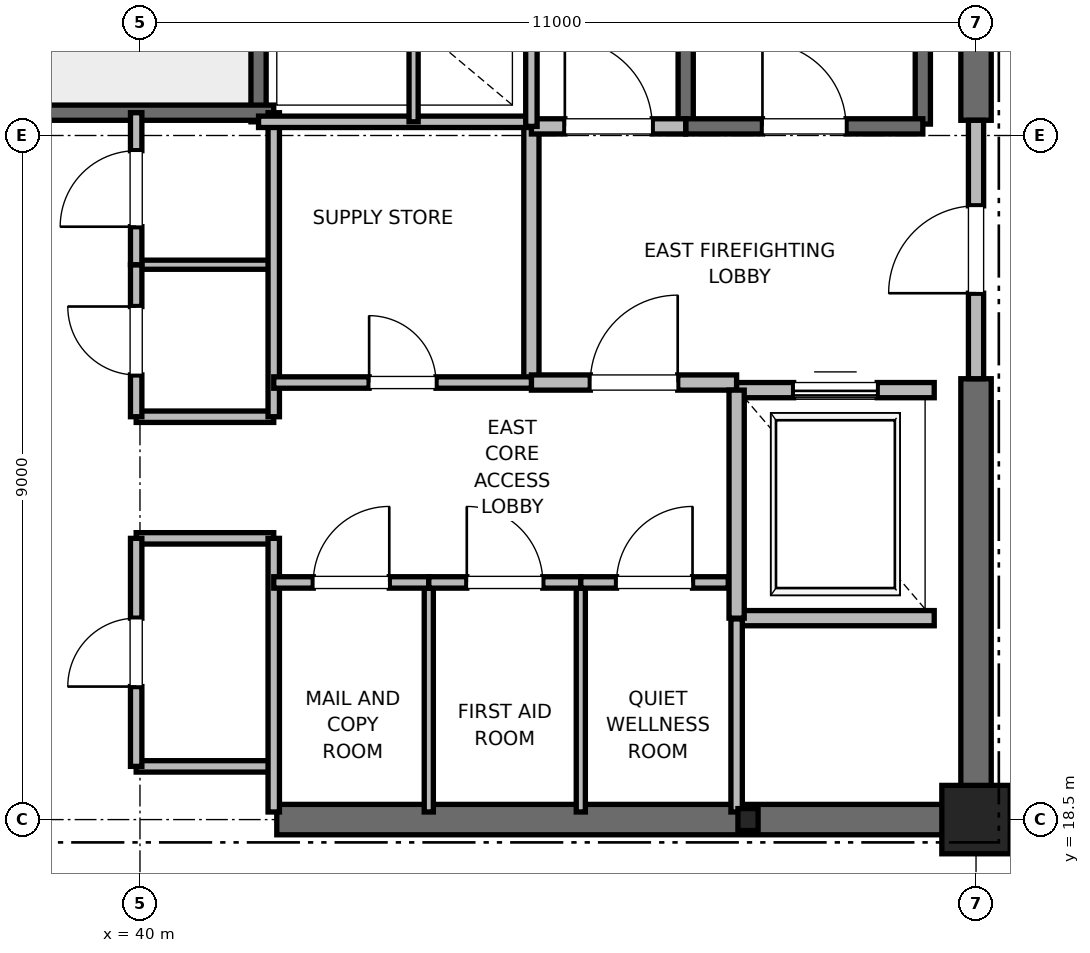
"""IFC4 building model, lengths in metres.
Left out: names, types, materials, properties, quantities, classifications, styles, units other than length and angle.
Written with IfcOpenShell. Run it as: python <this file> out.ifc"""

import sys

from ifc_helpers import new_model, si_unit, direction, frame, frame_2d, origin, origin_2d, place, context, subcontext, project, spatial, rectangle, i_section, extrude, element, fill, save


model = new_model("IFC4")
c1 = context("Model", 3, precision=1e-05, world=origin(), true_north=direction((0.0, 1.0)))
c2 = subcontext(c1, "Body", "Model", "MODEL_VIEW")
j1 = project(units=[si_unit("LENGTHUNIT", "METRE"), si_unit("PLANEANGLEUNIT", "RADIAN")], contexts=[c1])
p1 = place(None, origin())
s1 = spatial("IfcSite", under=j1, at=p1, CompositionType="ELEMENT")
p2 = place(p1, origin())
s2 = spatial("IfcBuilding", under=s1, at=p2, CompositionType="ELEMENT")
p3 = place(p2, frame((0.0, 0.0, 348.8)))
s3 = spatial("IfcBuildingStorey", under=s2, at=p3, CompositionType="ELEMENT", Elevation=348.8)
p4 = place(p3, frame((51.0, 18.5, 0.0), z_axis=(0.0, 0.0, 1.0), x_axis=(1.0, 0.0, 0.0)))
e1 = element("IfcColumn", 1, at=p4, inside=s3, PredefinedType="PILASTER", context=c2, shape_type="SweptSolid", body=[
    extrude(rectangle(XDim=0.9, YDim=0.9, at=origin_2d()), origin(), (0.0, 0.0, 1.0), 5.5),
])
p5 = place(p3, frame((48.0, 18.5, 0.0), z_axis=(0.0, 0.0, 1.0), x_axis=(1.0, 0.0, 0.0)))
e2 = element("IfcColumn", 2, at=p5, inside=s3, PredefinedType="COLUMN", context=c2, shape_type="SweptSolid", body=[
    extrude(i_section(OverallWidth=0.265, OverallDepth=0.289, WebThickness=0.019, FlangeThickness=0.032, FilletRadius=0.013, at=origin_2d()), origin(), (0.0, 0.0, 1.0), 5.5),
])
p6 = place(p3, frame((41.8, 18.5, 0.0), z_axis=(0.0, 0.0, 1.0), x_axis=(1.0, 0.0, 0.0)))
e3 = element("IfcWall", 3, at=p6, inside=s3, PredefinedType="SHEAR", context=c2, shape_type="SweptSolid", body=[
    extrude(rectangle(XDim=9.2, YDim=0.4, at=frame_2d((4.6, 0.0))), origin(), (0.0, 0.0, 1.0), 5.2),
])
p7 = place(p3, frame((51.0, 18.5, 0.0), z_axis=(0.0, 0.0, 1.0), x_axis=(0.0, 1.0, 0.0)))
e4 = element("IfcWall", 4, at=p7, inside=s3, PredefinedType="SHEAR", context=c2, shape_type="SweptSolid", body=[
    extrude(rectangle(XDim=5.8, YDim=0.4, at=frame_2d((2.9, 0.0))), origin(), (0.0, 0.0, 1.0), 5.2),
])
p8 = place(p3, frame((51.0, 27.7, 0.0), z_axis=(0.0, 0.0, 1.0), x_axis=(0.0, 1.0, 0.0)))
e5 = element("IfcWall", 5, at=p8, inside=s3, PredefinedType="SHEAR", context=c2, shape_type="SweptSolid", body=[
    extrude(rectangle(XDim=8.8, YDim=0.4, at=frame_2d((4.4, 0.0))), origin(), (0.0, 0.0, 1.0), 5.2),
])
p9 = place(p3, frame((50.3, 27.65, 0.0), z_axis=(0.0, 0.0, 1.0), x_axis=(0.0, 1.0, 0.0)))
e6 = element("IfcWall", 6, at=p9, inside=s3, PredefinedType="SOLIDWALL", context=c2, shape_type="SweptSolid", body=[
    extrude(rectangle(XDim=8.15, YDim=0.2, at=frame_2d((4.075, 0.0))), origin(), (0.0, 0.0, 1.0), 5.2),
])
p10 = place(p3, frame((47.18, 27.62, 0.0), z_axis=(0.0, 0.0, 1.0), x_axis=(0.0, 1.0, 0.0)))
e7 = element("IfcWall", 7, at=p10, inside=s3, PredefinedType="SOLIDWALL", context=c2, shape_type="SweptSolid", body=[
    extrude(rectangle(XDim=8.18, YDim=0.2, at=frame_2d((4.09, 0.0))), origin(), (0.0, 0.0, 1.0), 5.2),
])
p11 = place(p3, frame((47.18, 27.62, 0.0), z_axis=(0.0, 0.0, 1.0), x_axis=(1.0, 0.0, 0.0)))
e8 = element("IfcWall", 8, at=p11, inside=s3, PredefinedType="SOLIDWALL", context=c2, shape_type="SweptSolid", body=[
    extrude(rectangle(XDim=3.12, YDim=0.2, at=frame_2d((1.56, 0.0))), origin(), (0.0, 0.0, 1.0), 5.2),
])
p12 = place(p11, frame((1.01, 0.0, 0.0)))
e9 = element("IfcOpeningElement", 9, at=p12, cuts=e8, PredefinedType="OPENING", context=c2, shape_type="SweptSolid", body=[
    extrude(rectangle(XDim=1.1, YDim=2.15, at=frame_2d((0.55, 1.075))), frame((0.0, 0.1, 0.0), z_axis=(0.0, -1.0, 0.0), x_axis=(1.0, 0.0, 0.0)), (0.0, 0.0, 1.0), 0.2),
])
p13 = place(p3, frame((41.56, 27.68, 0.0), z_axis=(0.0, 0.0, 1.0), x_axis=(0.0, 1.0, 0.0)))
e10 = element("IfcWall", 10, at=p13, inside=s3, PredefinedType="SOLIDWALL", context=c2, shape_type="SweptSolid", body=[
    extrude(rectangle(XDim=8.57, YDim=0.2, at=frame_2d((4.285, 0.0))), origin(), (0.0, 0.0, 1.0), 5.2),
])
p14 = place(p3, frame((38.44, 27.8, 0.0), z_axis=(0.0, 0.0, 1.0), x_axis=(1.0, 0.0, 0.0)))
e11 = element("IfcWall", 11, at=p14, inside=s3, PredefinedType="SOLIDWALL", context=c2, shape_type="SweptSolid", body=[
    extrude(rectangle(XDim=3.32, YDim=0.2, at=frame_2d((1.66, 0.0))), origin(), (0.0, 0.0, 1.0), 5.2),
])
p15 = place(p3, frame((45.15, 24.25, 0.0), z_axis=(0.0, 0.0, 1.0), x_axis=(0.0, 1.0, 0.0)))
e12 = element("IfcWall", 12, at=p15, inside=s3, PredefinedType="PARTITIONING", context=c2, shape_type="SweptSolid", body=[
    extrude(rectangle(XDim=3.37, YDim=0.2, at=frame_2d((1.685, 0.0))), origin(), (0.0, 0.0, 1.0), 5.2),
])
p16 = place(p3, frame((45.15, 24.25, 0.0), z_axis=(0.0, 0.0, 1.0), x_axis=(1.0, 0.0, 0.0)))
e13 = element("IfcWall", 13, at=p16, inside=s3, PredefinedType="PARTITIONING", context=c2, shape_type="SweptSolid", body=[
    extrude(rectangle(XDim=2.7, YDim=0.2, at=frame_2d((1.35, 0.0))), origin(), (0.0, 0.0, 1.0), 5.2),
])
p17 = place(p16, frame((0.775, 0.0, 0.0)))
e14 = element("IfcOpeningElement", 14, at=p17, cuts=e13, PredefinedType="OPENING", context=c2, shape_type="SweptSolid", body=[
    extrude(rectangle(XDim=1.15, YDim=2.2, at=frame_2d((0.575, 1.1))), frame((0.0, 0.1, 0.0), z_axis=(0.0, -1.0, 0.0), x_axis=(1.0, 0.0, 0.0)), (0.0, 0.0, 1.0), 0.2),
])
p18 = place(p3, frame((45.15, 27.62, 0.0), z_axis=(0.0, 0.0, 1.0), x_axis=(1.0, 0.0, 0.0)))
e15 = element("IfcWall", 15, at=p18, inside=s3, PredefinedType="PARTITIONING", context=c2, shape_type="SweptSolid", body=[
    extrude(rectangle(XDim=2.03, YDim=0.2, at=frame_2d((1.015, 0.0))), origin(), (0.0, 0.0, 1.0), 5.2),
])
p19 = place(p18, frame((0.44, 0.0, 0.0)))
e16 = element("IfcOpeningElement", 16, at=p19, cuts=e15, PredefinedType="OPENING", context=c2, shape_type="SweptSolid", body=[
    extrude(rectangle(XDim=1.15, YDim=2.2, at=frame_2d((0.575, 1.1))), frame((0.0, 0.1, 0.0), z_axis=(0.0, -1.0, 0.0), x_axis=(1.0, 0.0, 0.0)), (0.0, 0.0, 1.0), 0.2),
])
p20 = place(p3, frame((51.0, 24.3, 0.0), z_axis=(0.0, 0.0, 1.0), x_axis=(0.0, 1.0, 0.0)))
e17 = element("IfcWall", 17, at=p20, inside=s3, PredefinedType="PARTITIONING", context=c2, shape_type="SweptSolid", body=[
    extrude(rectangle(XDim=3.4, YDim=0.2, at=frame_2d((1.7, 0.0))), origin(), (0.0, 0.0, 1.0), 4.28),
])
p21 = place(p20, frame((1.125, 0.0, 0.0)))
e18 = element("IfcOpeningElement", 18, at=p21, cuts=e17, PredefinedType="OPENING", context=c2, shape_type="SweptSolid", body=[
    extrude(rectangle(XDim=1.15, YDim=2.2, at=frame_2d((0.575, 1.1))), frame((0.0, 0.1, 0.0), z_axis=(0.0, -1.0, 0.0), x_axis=(1.0, 0.0, 0.0)), (0.0, 0.0, 1.0), 0.2),
])
p22 = place(p3, frame((47.85, 21.15, 0.0), z_axis=(0.0, 0.0, 1.0), x_axis=(1.0, 0.0, 0.0)))
e19 = element("IfcWall", 19, at=p22, inside=s3, PredefinedType="SOLIDWALL", context=c2, shape_type="SweptSolid", body=[
    extrude(rectangle(XDim=2.6, YDim=0.2, at=frame_2d((1.3, 0.0))), origin(), (0.0, 0.0, 1.0), 5.2),
])
p23 = place(p3, frame((50.45, 24.15, 0.0), z_axis=(0.0, 0.0, 1.0), x_axis=(-1.0, 0.0, 0.0)))
e20 = element("IfcWall", 20, at=p23, inside=s3, PredefinedType="SOLIDWALL", context=c2, shape_type="SweptSolid", body=[
    extrude(rectangle(XDim=2.6, YDim=0.2, at=frame_2d((1.3, 0.0))), origin(), (0.0, 0.0, 1.0), 4.28),
])
p24 = place(p23, frame((0.75, 0.0, 0.0)))
e21 = element("IfcOpeningElement", 21, at=p24, cuts=e20, PredefinedType="OPENING", context=c2, shape_type="SweptSolid", body=[
    extrude(rectangle(XDim=1.1, YDim=2.2, at=frame_2d((0.55, 1.1))), frame((0.0, 0.1, 0.0), z_axis=(0.0, -1.0, 0.0), x_axis=(1.0, 0.0, 0.0)), (0.0, 0.0, 1.0), 0.2),
])
p25 = place(p3, frame((47.85, 24.15, 0.0), z_axis=(0.0, 0.0, 1.0), x_axis=(0.0, -1.0, 0.0)))
e22 = element("IfcWall", 22, at=p25, inside=s3, PredefinedType="SOLIDWALL", context=c2, shape_type="SweptSolid", body=[
    extrude(rectangle(XDim=3.0, YDim=0.2, at=frame_2d((1.5, 0.0))), origin(), (0.0, 0.0, 1.0), 5.2),
])
for number, where, z_axis, x_axis in (
    (23, (39.95, 19.2, 0.0), (0.0, 0.0, 1.0), (1.0, 0.0, 0.0)),
    (24, (39.95, 22.2, 0.0), (0.0, 0.0, 1.0), (1.0, 0.0, 0.0)),
    (25, (39.95, 23.8, 0.0), (0.0, 0.0, 1.0), (1.0, 0.0, 0.0)),
):
    element("IfcWall", number, at=place(p3, frame(where, z_axis=z_axis, x_axis=x_axis)), inside=s3, PredefinedType="PARTITIONING", context=c2, shape_type="SweptSolid", body=[
        extrude(rectangle(XDim=1.81, YDim=0.15, at=frame_2d((0.905, 0.0))), origin(), (0.0, 0.0, 1.0), 2.85),
    ])
p26 = place(p3, frame((39.95, 25.8, 0.0), z_axis=(0.0, 0.0, 1.0), x_axis=(1.0, 0.0, 0.0)))
e26 = element("IfcWall", 26, at=p26, inside=s3, PredefinedType="PARTITIONING", context=c2, shape_type="SweptSolid", body=[
    extrude(rectangle(XDim=1.81, YDim=0.12, at=frame_2d((0.905, 0.0))), origin(), (0.0, 0.0, 1.0), 2.85),
])
p27 = place(p3, frame((41.76, 18.6, 0.0), z_axis=(0.0, 0.0, 1.0), x_axis=(0.0, 1.0, 0.0)))
e27 = element("IfcWall", 27, at=p27, inside=s3, PredefinedType="PARTITIONING", context=c2, shape_type="SweptSolid", body=[
    extrude(rectangle(XDim=3.6, YDim=0.15, at=frame_2d((1.8, 0.0))), origin(), (0.0, 0.0, 1.0), 2.85),
])
p28 = place(p3, frame((41.76, 23.8, 0.0), z_axis=(0.0, 0.0, 1.0), x_axis=(0.0, 1.0, 0.0)))
e28 = element("IfcWall", 28, at=p28, inside=s3, PredefinedType="PARTITIONING", context=c2, shape_type="SweptSolid", body=[
    extrude(rectangle(XDim=4.0, YDim=0.15, at=frame_2d((2.0, 0.0))), origin(), (0.0, 0.0, 1.0), 2.85),
])
p29 = place(p3, frame((39.95, 19.2, 0.0), z_axis=(0.0, 0.0, 1.0), x_axis=(0.0, 1.0, 0.0)))
e29 = element("IfcWall", 29, at=p29, inside=s3, PredefinedType="PARTITIONING", context=c2, shape_type="SweptSolid", body=[
    extrude(rectangle(XDim=3.0, YDim=0.15, at=frame_2d((1.5, 0.0))), origin(), (0.0, 0.0, 1.0), 2.85),
])
p30 = place(p29, frame((1.05, 0.0, 0.0)))
e30 = element("IfcOpeningElement", 30, at=p30, cuts=e29, PredefinedType="OPENING", context=c2, shape_type="SweptSolid", body=[
    extrude(rectangle(XDim=0.9, YDim=2.1, at=frame_2d((0.45, 1.05))), frame((0.0, 0.075, 0.0), z_axis=(0.0, -1.0, 0.0), x_axis=(1.0, 0.0, 0.0)), (0.0, 0.0, 1.0), 0.15),
])
p31 = place(p3, frame((39.95, 23.8, 0.0), z_axis=(0.0, 0.0, 1.0), x_axis=(0.0, 1.0, 0.0)))
e31 = element("IfcWall", 31, at=p31, inside=s3, PredefinedType="PARTITIONING", context=c2, shape_type="SweptSolid", body=[
    extrude(rectangle(XDim=2.0, YDim=0.15, at=frame_2d((1.0, 0.0))), origin(), (0.0, 0.0, 1.0), 2.85),
])
p32 = place(p31, frame((0.55, 0.0, 0.0)))
e32 = element("IfcOpeningElement", 32, at=p32, cuts=e31, PredefinedType="OPENING", context=c2, shape_type="SweptSolid", body=[
    extrude(rectangle(XDim=0.9, YDim=2.1, at=frame_2d((0.45, 1.05))), frame((0.0, 0.075, 0.0), z_axis=(0.0, -1.0, 0.0), x_axis=(1.0, 0.0, 0.0)), (0.0, 0.0, 1.0), 0.15),
])
p33 = place(p3, frame((39.95, 25.8, 0.0), z_axis=(0.0, 0.0, 1.0), x_axis=(0.0, 1.0, 0.0)))
e33 = element("IfcWall", 33, at=p33, inside=s3, PredefinedType="PARTITIONING", context=c2, shape_type="SweptSolid", body=[
    extrude(rectangle(XDim=2.0, YDim=0.15, at=frame_2d((1.0, 0.0))), origin(), (0.0, 0.0, 1.0), 2.85),
])
p34 = place(p33, frame((0.5, 0.0, 0.0)))
e34 = element("IfcOpeningElement", 34, at=p34, cuts=e33, PredefinedType="OPENING", context=c2, shape_type="SweptSolid", body=[
    extrude(rectangle(XDim=1.0, YDim=2.15, at=frame_2d((0.5, 1.075))), frame((0.0, 0.075, 0.0), z_axis=(0.0, -1.0, 0.0), x_axis=(1.0, 0.0, 0.0)), (0.0, 0.0, 1.0), 0.15),
])
p35 = place(p3, frame((41.56, 27.68, 0.0), z_axis=(0.0, 0.0, 1.0), x_axis=(1.0, 0.0, 0.0)))
e35 = element("IfcWall", 35, at=p35, inside=s3, PredefinedType="PARTITIONING", context=c2, shape_type="SweptSolid", body=[
    extrude(rectangle(XDim=3.59, YDim=0.15, at=frame_2d((1.795, 0.0))), origin(), (0.0, 0.0, 1.0), 2.85),
])
p36 = place(p3, frame((47.85, 18.6, 0.0), z_axis=(0.0, 0.0, 1.0), x_axis=(0.0, 1.0, 0.0)))
e36 = element("IfcWall", 36, at=p36, inside=s3, PredefinedType="PARTITIONING", context=c2, shape_type="SweptSolid", body=[
    extrude(rectangle(XDim=2.54, YDim=0.15, at=frame_2d((1.27, 0.0))), origin(), (0.0, 0.0, 1.0), 2.85),
])
for number, where, z_axis, x_axis in (
    (37, (43.8, 18.6, 0.0), (0.0, 0.0, 1.0), (0.0, 1.0, 0.0)),
    (38, (45.8, 18.6, 0.0), (0.0, 0.0, 1.0), (0.0, 1.0, 0.0)),
):
    element("IfcWall", number, at=place(p3, frame(where, z_axis=z_axis, x_axis=x_axis)), inside=s3, PredefinedType="PARTITIONING", context=c2, shape_type="SweptSolid", body=[
        extrude(rectangle(XDim=3.02, YDim=0.12, at=frame_2d((1.51, 0.0))), origin(), (0.0, 0.0, 1.0), 2.85),
    ])
p37 = place(p3, frame((41.76, 21.62, 0.0), z_axis=(0.0, 0.0, 1.0), x_axis=(1.0, 0.0, 0.0)))
e39 = element("IfcWall", 39, at=p37, inside=s3, PredefinedType="PARTITIONING", context=c2, shape_type="SweptSolid", body=[
    extrude(rectangle(XDim=2.04, YDim=0.15, at=frame_2d((1.02, 0.0))), origin(), (0.0, 0.0, 1.0), 2.85),
])
p38 = place(p37, frame((0.52, 0.0, 0.0)))
e40 = element("IfcOpeningElement", 40, at=p38, cuts=e39, PredefinedType="OPENING", context=c2, shape_type="SweptSolid", body=[
    extrude(rectangle(XDim=1.0, YDim=2.15, at=frame_2d((0.5, 1.075))), frame((0.0, 0.075, 0.0), z_axis=(0.0, -1.0, 0.0), x_axis=(1.0, 0.0, 0.0)), (0.0, 0.0, 1.0), 0.15),
])
p39 = place(p3, frame((43.8, 21.62, 0.0), z_axis=(0.0, 0.0, 1.0), x_axis=(1.0, 0.0, 0.0)))
e41 = element("IfcWall", 41, at=p39, inside=s3, PredefinedType="PARTITIONING", context=c2, shape_type="SweptSolid", body=[
    extrude(rectangle(XDim=2.0, YDim=0.15, at=frame_2d((1.0, 0.0))), origin(), (0.0, 0.0, 1.0), 2.85),
])
p40 = place(p39, frame((0.5, 0.0, 0.0)))
e42 = element("IfcOpeningElement", 42, at=p40, cuts=e41, PredefinedType="OPENING", context=c2, shape_type="SweptSolid", body=[
    extrude(rectangle(XDim=1.0, YDim=2.15, at=frame_2d((0.5, 1.075))), frame((0.0, 0.075, 0.0), z_axis=(0.0, -1.0, 0.0), x_axis=(1.0, 0.0, 0.0)), (0.0, 0.0, 1.0), 0.15),
])
p41 = place(p3, frame((45.8, 21.62, 0.0), z_axis=(0.0, 0.0, 1.0), x_axis=(1.0, 0.0, 0.0)))
e43 = element("IfcWall", 43, at=p41, inside=s3, PredefinedType="PARTITIONING", context=c2, shape_type="SweptSolid", body=[
    extrude(rectangle(XDim=1.94, YDim=0.15, at=frame_2d((0.97, 0.0))), origin(), (0.0, 0.0, 1.0), 2.85),
])
p42 = place(p41, frame((0.47, 0.0, 0.0)))
e44 = element("IfcOpeningElement", 44, at=p42, cuts=e43, PredefinedType="OPENING", context=c2, shape_type="SweptSolid", body=[
    extrude(rectangle(XDim=1.0, YDim=2.15, at=frame_2d((0.5, 1.075))), frame((0.0, 0.075, 0.0), z_axis=(0.0, -1.0, 0.0), x_axis=(1.0, 0.0, 0.0)), (0.0, 0.0, 1.0), 0.15),
])
p43 = place(p3, frame((41.76, 24.25, 0.0), z_axis=(0.0, 0.0, 1.0), x_axis=(1.0, 0.0, 0.0)))
e45 = element("IfcWall", 45, at=p43, inside=s3, PredefinedType="PARTITIONING", context=c2, shape_type="SweptSolid", body=[
    extrude(rectangle(XDim=3.39, YDim=0.15, at=frame_2d((1.695, 0.0))), origin(), (0.0, 0.0, 1.0), 2.85),
])
p44 = place(p43, frame((1.255, 0.0, 0.0)))
e46 = element("IfcOpeningElement", 46, at=p44, cuts=e45, PredefinedType="OPENING", context=c2, shape_type="SweptSolid", body=[
    extrude(rectangle(XDim=0.88, YDim=2.1, at=frame_2d((0.44, 1.05))), frame((0.0, 0.075, 0.0), z_axis=(0.0, -1.0, 0.0), x_axis=(1.0, 0.0, 0.0)), (0.0, 0.0, 1.0), 0.15),
])
p45 = place(p3, frame((45.15, 27.62, 0.0), z_axis=(0.0, 0.0, 1.0), x_axis=(0.0, 1.0, 0.0)))
e47 = element("IfcWall", 47, at=p45, inside=s3, PredefinedType="PARTITIONING", context=c2, shape_type="SweptSolid", body=[
    extrude(rectangle(XDim=3.1, YDim=0.15, at=frame_2d((1.55, 0.0))), origin(), (0.0, 0.0, 1.0), 2.85),
])
p46 = place(p3, frame((43.6, 27.68, 0.0), z_axis=(0.0, 0.0, 1.0), x_axis=(0.0, 1.0, 0.0)))
e48 = element("IfcWall", 48, at=p46, inside=s3, PredefinedType="PARTITIONING", context=c2, shape_type="SweptSolid", body=[
    extrude(rectangle(XDim=3.04, YDim=0.12, at=frame_2d((1.52, 0.0))), origin(), (0.0, 0.0, 1.0), 2.85),
])
p47 = place(p12, origin())
e49 = element("IfcDoor", 49, at=p47, inside=s3, OperationType="SINGLE_SWING_LEFT", PredefinedType="DOOR", context=c2, shape_type="SweptSolid", body=[
    extrude(rectangle(XDim=1.1, YDim=2.15, at=frame_2d((0.55, 1.075))), frame((0.0, 0.025, 0.0), z_axis=(0.0, -1.0, 0.0), x_axis=(1.0, 0.0, 0.0)), (0.0, 0.0, 1.0), 0.05),
])
fill(e9, e49)
p48 = place(p17, origin())
e50 = element("IfcDoor", 50, at=p48, inside=s3, OperationType="SINGLE_SWING_RIGHT", PredefinedType="DOOR", context=c2, shape_type="SweptSolid", body=[
    extrude(rectangle(XDim=1.15, YDim=2.2, at=frame_2d((0.575, 1.1))), frame((0.0, 0.025, 0.0), z_axis=(0.0, -1.0, 0.0), x_axis=(1.0, 0.0, 0.0)), (0.0, 0.0, 1.0), 0.05),
])
fill(e14, e50)
p49 = place(p19, origin())
e51 = element("IfcDoor", 51, at=p49, inside=s3, OperationType="SINGLE_SWING_LEFT", PredefinedType="DOOR", context=c2, shape_type="SweptSolid", body=[
    extrude(rectangle(XDim=1.15, YDim=2.2, at=frame_2d((0.575, 1.1))), frame((0.0, 0.025, 0.0), z_axis=(0.0, -1.0, 0.0), x_axis=(1.0, 0.0, 0.0)), (0.0, 0.0, 1.0), 0.05),
])
fill(e16, e51)
p50 = place(p21, origin())
e52 = element("IfcDoor", 52, at=p50, inside=s3, OperationType="SINGLE_SWING_LEFT", PredefinedType="DOOR", context=c2, shape_type="SweptSolid", body=[
    extrude(rectangle(XDim=1.15, YDim=2.2, at=frame_2d((0.575, 1.1))), frame((0.0, 0.025, 0.0), z_axis=(0.0, -1.0, 0.0), x_axis=(1.0, 0.0, 0.0)), (0.0, 0.0, 1.0), 0.05),
])
fill(e18, e52)
p51 = place(p24, origin())
e53 = element("IfcDoor", 53, at=p51, inside=s3, OperationType="SLIDING_TO_RIGHT", PredefinedType="DOOR", context=c2, shape_type="SweptSolid", body=[
    extrude(rectangle(XDim=1.1, YDim=2.2, at=frame_2d((0.55, 1.1))), frame((0.0, 0.025, 0.0), z_axis=(0.0, -1.0, 0.0), x_axis=(1.0, 0.0, 0.0)), (0.0, 0.0, 1.0), 0.05),
])
fill(e21, e53)
p52 = place(p30, origin())
e54 = element("IfcDoor", 54, at=p52, inside=s3, OperationType="SINGLE_SWING_LEFT", PredefinedType="DOOR", context=c2, shape_type="SweptSolid", body=[
    extrude(rectangle(XDim=0.9, YDim=2.1, at=frame_2d((0.45, 1.05))), frame((0.0, 0.025, 0.0), z_axis=(0.0, -1.0, 0.0), x_axis=(1.0, 0.0, 0.0)), (0.0, 0.0, 1.0), 0.05),
])
fill(e30, e54)
p53 = place(p32, origin())
e55 = element("IfcDoor", 55, at=p53, inside=s3, OperationType="SINGLE_SWING_RIGHT", PredefinedType="DOOR", context=c2, shape_type="SweptSolid", body=[
    extrude(rectangle(XDim=0.9, YDim=2.1, at=frame_2d((0.45, 1.05))), frame((0.0, 0.025, 0.0), z_axis=(0.0, -1.0, 0.0), x_axis=(1.0, 0.0, 0.0)), (0.0, 0.0, 1.0), 0.05),
])
fill(e32, e55)
p54 = place(p34, origin())
e56 = element("IfcDoor", 56, at=p54, inside=s3, OperationType="SINGLE_SWING_LEFT", PredefinedType="DOOR", context=c2, shape_type="SweptSolid", body=[
    extrude(rectangle(XDim=1.0, YDim=2.15, at=frame_2d((0.5, 1.075))), frame((0.0, 0.025, 0.0), z_axis=(0.0, -1.0, 0.0), x_axis=(1.0, 0.0, 0.0)), (0.0, 0.0, 1.0), 0.05),
])
fill(e34, e56)
p55 = place(p38, origin())
e57 = element("IfcDoor", 57, at=p55, inside=s3, OperationType="SINGLE_SWING_RIGHT", PredefinedType="DOOR", context=c2, shape_type="SweptSolid", body=[
    extrude(rectangle(XDim=1.0, YDim=2.15, at=frame_2d((0.5, 1.075))), frame((0.0, 0.025, 0.0), z_axis=(0.0, -1.0, 0.0), x_axis=(1.0, 0.0, 0.0)), (0.0, 0.0, 1.0), 0.05),
])
fill(e40, e57)
p56 = place(p40, origin())
e58 = element("IfcDoor", 58, at=p56, inside=s3, OperationType="SINGLE_SWING_LEFT", PredefinedType="DOOR", context=c2, shape_type="SweptSolid", body=[
    extrude(rectangle(XDim=1.0, YDim=2.15, at=frame_2d((0.5, 1.075))), frame((0.0, 0.025, 0.0), z_axis=(0.0, -1.0, 0.0), x_axis=(1.0, 0.0, 0.0)), (0.0, 0.0, 1.0), 0.05),
])
fill(e42, e58)
p57 = place(p42, origin())
e59 = element("IfcDoor", 59, at=p57, inside=s3, OperationType="SINGLE_SWING_RIGHT", PredefinedType="DOOR", context=c2, shape_type="SweptSolid", body=[
    extrude(rectangle(XDim=1.0, YDim=2.15, at=frame_2d((0.5, 1.075))), frame((0.0, 0.025, 0.0), z_axis=(0.0, -1.0, 0.0), x_axis=(1.0, 0.0, 0.0)), (0.0, 0.0, 1.0), 0.05),
])
fill(e44, e59)
p58 = place(p44, origin())
e60 = element("IfcDoor", 60, at=p58, inside=s3, OperationType="SINGLE_SWING_LEFT", PredefinedType="DOOR", context=c2, shape_type="SweptSolid", body=[
    extrude(rectangle(XDim=0.88, YDim=2.1, at=frame_2d((0.44, 1.05))), frame((0.0, 0.025, 0.0), z_axis=(0.0, -1.0, 0.0), x_axis=(1.0, 0.0, 0.0)), (0.0, 0.0, 1.0), 0.05),
])
fill(e46, e60)
save(model, sys.argv[1])
